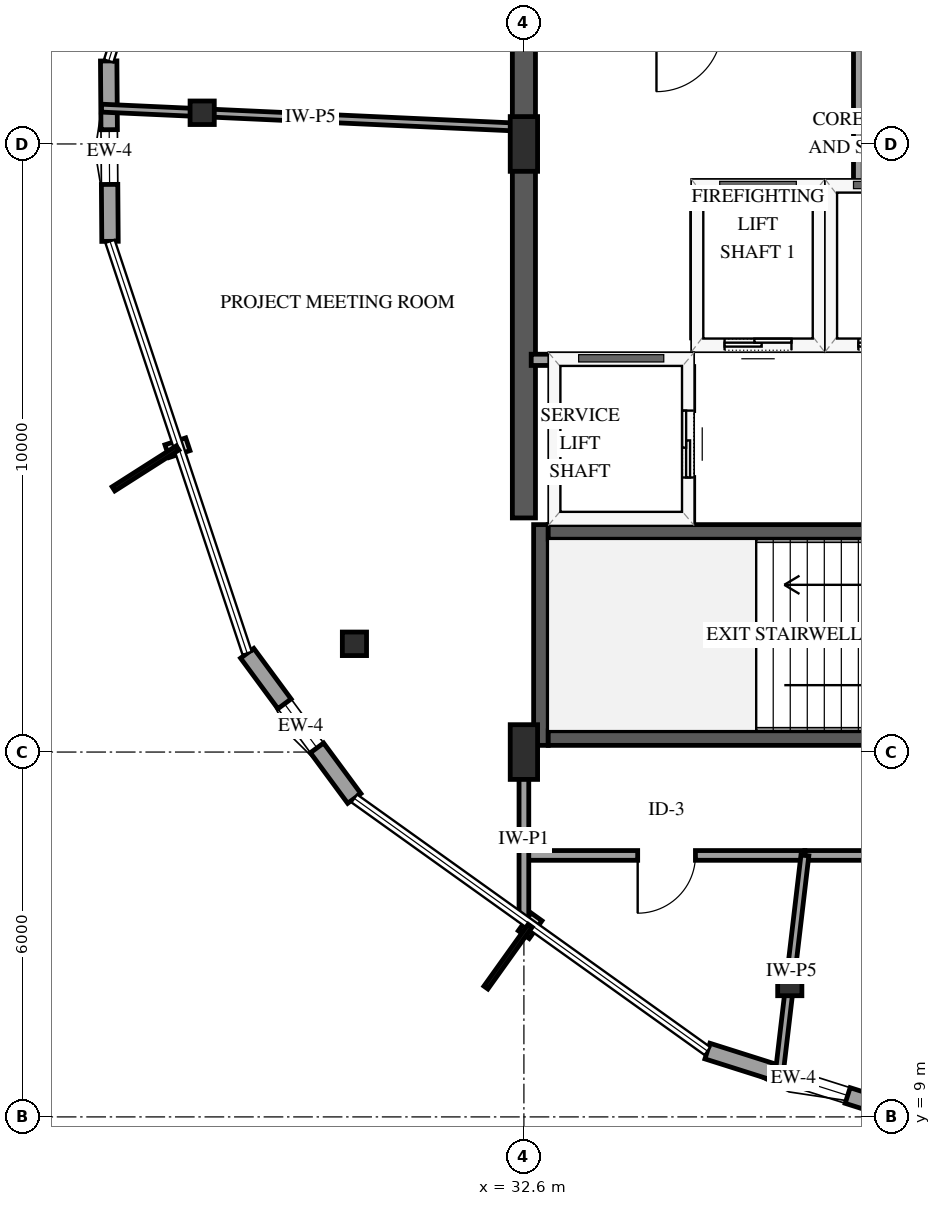
"""IFC4 building model, lengths in metres.
Left out: names, types, materials, properties, quantities, classifications, styles, units other than length and angle.
Written with IfcOpenShell. Run it as: python <this file> out.ifc"""

import sys

from ifc_helpers import new_model, si_unit, direction, frame, frame_2d, origin, origin_2d, place, context, subcontext, project, spatial, rectangle, i_section, extrude, element, fill, save


model = new_model("IFC4")
c1 = context("Model", 3, precision=1e-05, world=origin(), true_north=direction((0.0, 1.0)))
c2 = subcontext(c1, "Body", "Model", "MODEL_VIEW")
j1 = project(units=[si_unit("LENGTHUNIT", "METRE"), si_unit("PLANEANGLEUNIT", "RADIAN")], contexts=[c1])
p1 = place(None, origin())
s1 = spatial("IfcSite", under=j1, at=p1, CompositionType="ELEMENT")
p2 = place(p1, origin())
s2 = spatial("IfcBuilding", under=s1, at=p2, CompositionType="ELEMENT")
p3 = place(p2, frame((0.0, 0.0, 301.45)))
s3 = spatial("IfcBuildingStorey", under=s2, at=p3, CompositionType="ELEMENT", Elevation=301.45)
p4 = place(p3, frame((32.88, 15.11, 0.0), z_axis=(0.0, 0.0, 1.0), x_axis=(0.0, 1.0, 0.0)))
e1 = element("IfcWall", 1, at=p4, inside=s3, PredefinedType="SHEAR", context=c2, shape_type="SweptSolid", body=[
    extrude(rectangle(XDim=3.63, YDim=0.24, at=frame_2d((1.815, 0.0))), origin(), (0.0, 0.0, 1.0), 4.2),
])
for number, where, z_axis, x_axis in (
    (2, (33.0, 15.23, 0.0), (0.0, 0.0, 1.0), (1.0, 0.0, 0.0)),
    (3, (33.0, 18.62, 0.0), (0.0, 0.0, 1.0), (1.0, 0.0, 0.0)),
):
    element("IfcWall", number, at=place(p3, frame(where, z_axis=z_axis, x_axis=x_axis)), inside=s3, PredefinedType="SHEAR", context=c2, shape_type="SweptSolid", body=[
        extrude(rectangle(XDim=8.0, YDim=0.24, at=frame_2d((4.0, 0.0))), origin(), (0.0, 0.0, 1.0), 4.2),
    ])
p5 = place(p3, frame((32.6, 18.85, 0.0), z_axis=(0.0, 0.0, 1.0), x_axis=(0.0, 1.0, 0.0)))
e4 = element("IfcWall", 4, at=p5, inside=s3, PredefinedType="SHEAR", context=c2, shape_type="SweptSolid", body=[
    extrude(rectangle(XDim=12.3, YDim=0.38, at=frame_2d((6.15, 0.0))), origin(), (0.0, 0.0, 1.0), 4.2),
])
for number, where, z_axis, x_axis in (
    (5, (32.6, 15.0, 0.0), (0.0, 0.0, 1.0), (1.0, 0.0, 0.0)),
    (6, (32.6, 25.0, 0.0), (0.0, 0.0, 1.0), (1.0, 0.0, 0.0)),
):
    element("IfcColumn", number, at=place(p3, frame(where, z_axis=z_axis, x_axis=x_axis)), inside=s3, PredefinedType="PILASTER", context=c2, shape_type="SweptSolid", body=[
        extrude(rectangle(XDim=0.45, YDim=0.9, at=origin_2d()), origin(), (0.0, 0.0, 1.0), 4.2),
    ])
for number, where, z_axis, x_axis in (
    (7, (27.309, 25.513, 0.0), (0.0, 0.0, 1.0), (1.0, 0.0, 0.0)),
    (8, (29.813, 16.78, 0.0), (0.0, 0.0, 1.0), (1.0, 0.0, 0.0)),
    (9, (36.972, 11.187, 0.0), (0.0, 0.0, 1.0), (1.0, 0.0, 0.0)),
):
    element("IfcColumn", number, at=place(p3, frame(where, z_axis=z_axis, x_axis=x_axis)), inside=s3, PredefinedType="COLUMN", context=c2, shape_type="SweptSolid", body=[
        extrude(i_section(OverallWidth=0.398, OverallDepth=0.387, WebThickness=0.021, FlangeThickness=0.033, FilletRadius=0.038, at=origin_2d()), origin(), (0.0, 0.0, 1.0), 4.2),
    ])
p6 = place(p3, frame((25.771, 26.365, 0.0), z_axis=(0.0, 0.0, 1.0), x_axis=(0.007324906367, -0.999973172514, 0.0)))
e10 = element("IfcWall", 10, at=p6, inside=s3, PredefinedType="SOLIDWALL", context=c2, shape_type="SweptSolid", body=[
    extrude(rectangle(XDim=2.966, YDim=0.27, at=frame_2d((1.483, 0.0))), origin(), (0.0, 0.0, 1.0), 3.274),
])
p7 = place(p6, frame((1.131, 0.0, 0.75)))
e11 = element("IfcOpeningElement", 11, at=p7, cuts=e10, PredefinedType="OPENING", context=c2, shape_type="SweptSolid", body=[
    extrude(rectangle(XDim=0.9, YDim=1.5, at=frame_2d((0.45, 0.75))), frame((0.0, 0.145, 0.0), z_axis=(0.0, -1.0, 0.0), x_axis=(1.0, 0.0, 0.0)), (0.0, 0.0, 1.0), 0.29),
])
p8 = place(p3, frame((28.049, 16.624, 0.0), z_axis=(0.0, 0.0, 1.0), x_axis=(0.593687389238, -0.804695770997, 0.0)))
e12 = element("IfcWall", 12, at=p8, inside=s3, PredefinedType="SOLIDWALL", context=c2, shape_type="SweptSolid", body=[
    extrude(rectangle(XDim=2.967, YDim=0.27, at=frame_2d((1.483, 0.0))), origin(), (0.0, 0.0, 1.0), 3.274),
])
p9 = place(p8, frame((1.033, 0.0, 0.75)))
e13 = element("IfcOpeningElement", 13, at=p9, cuts=e12, PredefinedType="OPENING", context=c2, shape_type="SweptSolid", body=[
    extrude(rectangle(XDim=0.9, YDim=1.5, at=frame_2d((0.45, 0.75))), frame((0.0, 0.145, 0.0), z_axis=(0.0, -1.0, 0.0), x_axis=(1.0, 0.0, 0.0)), (0.0, 0.0, 1.0), 0.29),
])
p10 = place(p3, frame((35.618, 10.083, 0.0), z_axis=(0.0, 0.0, 1.0), x_axis=(0.953301162706, -0.302021345574, 0.0)))
e14 = element("IfcWall", 14, at=p10, inside=s3, PredefinedType="SOLIDWALL", context=c2, shape_type="SweptSolid", body=[
    extrude(rectangle(XDim=2.967, YDim=0.27, at=frame_2d((1.483, 0.0))), origin(), (0.0, 0.0, 1.0), 3.274),
])
p11 = place(p10, frame((1.519, 0.0, 0.75)))
e15 = element("IfcOpeningElement", 15, at=p11, cuts=e14, PredefinedType="OPENING", context=c2, shape_type="SweptSolid", body=[
    extrude(rectangle(XDim=0.9, YDim=1.5, at=frame_2d((0.45, 0.75))), frame((0.0, 0.145, 0.0), z_axis=(0.0, -1.0, 0.0), x_axis=(1.0, 0.0, 0.0)), (0.0, 0.0, 1.0), 0.29),
])
p12 = place(p3, frame((35.45, 21.7, 0.0), z_axis=(0.0, 0.0, 1.0), x_axis=(1.0, 0.0, 0.0)))
e16 = element("IfcWall", 16, at=p12, inside=s3, PredefinedType="SOLIDWALL", context=c2, shape_type="SweptSolid", body=[
    extrude(rectangle(XDim=2.0, YDim=0.185, at=frame_2d((1.0, 0.0))), origin(), (0.0, 0.0, 1.0), 3.895),
])
p13 = place(p12, frame((0.45, 0.0, 0.0)))
e17 = element("IfcOpeningElement", 17, at=p13, cuts=e16, PredefinedType="OPENING", context=c2, shape_type="SweptSolid", body=[
    extrude(rectangle(XDim=1.1, YDim=2.15, at=frame_2d((0.55, 1.075))), frame((0.0, 0.103, 0.0), z_axis=(0.0, -1.0, 0.0), x_axis=(1.0, 0.0, 0.0)), (0.0, 0.0, 1.0), 0.205),
])
p14 = place(p3, frame((35.45, 24.3, 0.0), z_axis=(0.0, 0.0, 1.0), x_axis=(1.0, 0.0, 0.0)))
e18 = element("IfcWall", 18, at=p14, inside=s3, PredefinedType="SOLIDWALL", context=c2, shape_type="SweptSolid", body=[
    extrude(rectangle(XDim=2.0, YDim=0.185, at=frame_2d((1.0, 0.0))), origin(), (0.0, 0.0, 1.0), 3.895),
])
for number, where, z_axis, x_axis in (
    (19, (35.45, 21.81, 0.0), (0.0, 0.0, 1.0), (0.0, 1.0, 0.0)),
    (20, (37.45, 21.81, 0.0), (0.0, 0.0, 1.0), (0.0, 1.0, 0.0)),
):
    element("IfcWall", number, at=place(p3, frame(where, z_axis=z_axis, x_axis=x_axis)), inside=s3, PredefinedType="SOLIDWALL", context=c2, shape_type="SweptSolid", body=[
        extrude(rectangle(XDim=2.38, YDim=0.185, at=frame_2d((1.19, 0.0))), origin(), (0.0, 0.0, 1.0), 3.895),
    ])
p15 = place(p3, frame((37.65, 21.7, 0.0), z_axis=(0.0, 0.0, 1.0), x_axis=(1.0, 0.0, 0.0)))
e21 = element("IfcWall", 21, at=p15, inside=s3, PredefinedType="SOLIDWALL", context=c2, shape_type="SweptSolid", body=[
    extrude(rectangle(XDim=2.0, YDim=0.185, at=frame_2d((1.0, 0.0))), origin(), (0.0, 0.0, 1.0), 3.895),
])
p16 = place(p15, frame((0.45, 0.0, 0.0)))
e22 = element("IfcOpeningElement", 22, at=p16, cuts=e21, PredefinedType="OPENING", context=c2, shape_type="SweptSolid", body=[
    extrude(rectangle(XDim=1.1, YDim=2.15, at=frame_2d((0.55, 1.075))), frame((0.0, 0.103, 0.0), z_axis=(0.0, -1.0, 0.0), x_axis=(1.0, 0.0, 0.0)), (0.0, 0.0, 1.0), 0.205),
])
p17 = place(p3, frame((37.65, 24.3, 0.0), z_axis=(0.0, 0.0, 1.0), x_axis=(1.0, 0.0, 0.0)))
e23 = element("IfcWall", 23, at=p17, inside=s3, PredefinedType="SOLIDWALL", context=c2, shape_type="SweptSolid", body=[
    extrude(rectangle(XDim=2.0, YDim=0.185, at=frame_2d((1.0, 0.0))), origin(), (0.0, 0.0, 1.0), 3.895),
])
p18 = place(p3, frame((32.72, 21.45, 0.0), z_axis=(0.0, 0.0, 1.0), x_axis=(1.0, 0.0, 0.0)))
e24 = element("IfcWall", 24, at=p18, inside=s3, PredefinedType="SOLIDWALL", context=c2, shape_type="SweptSolid", body=[
    extrude(rectangle(XDim=2.58, YDim=0.185, at=frame_2d((1.29, 0.0))), origin(), (0.0, 0.0, 1.0), 3.895),
])
p19 = place(p3, frame((35.3, 18.79, 0.0), z_axis=(0.0, 0.0, 1.0), x_axis=(0.0, 1.0, 0.0)))
e25 = element("IfcWall", 25, at=p19, inside=s3, PredefinedType="SOLIDWALL", context=c2, shape_type="SweptSolid", body=[
    extrude(rectangle(XDim=2.55, YDim=0.185, at=frame_2d((1.275, 0.0))), origin(), (0.0, 0.0, 1.0), 3.895),
])
p20 = place(p19, frame((0.725, 0.0, 0.0)))
e26 = element("IfcOpeningElement", 26, at=p20, cuts=e25, PredefinedType="OPENING", context=c2, shape_type="SweptSolid", body=[
    extrude(rectangle(XDim=1.1, YDim=2.15, at=frame_2d((0.55, 1.075))), frame((0.0, 0.103, 0.0), z_axis=(0.0, -1.0, 0.0), x_axis=(1.0, 0.0, 0.0)), (0.0, 0.0, 1.0), 0.205),
])
p21 = place(p3, frame((46.18, 13.3, 0.0), z_axis=(0.0, 0.0, 1.0), x_axis=(-1.0, 0.0, 0.0)))
e27 = element("IfcWall", 27, at=p21, inside=s3, PredefinedType="PARTITIONING", context=c2, shape_type="SweptSolid", body=[
    extrude(rectangle(XDim=8.959, YDim=0.16, at=frame_2d((4.479, 0.0))), origin(), (0.0, 0.0, 1.0), 3.895),
])
p22 = place(p21, frame((4.005, 0.0, 0.0)))
e28 = element("IfcOpeningElement", 28, at=p22, cuts=e27, PredefinedType="OPENING", context=c2, shape_type="SweptSolid", body=[
    extrude(rectangle(XDim=0.95, YDim=2.15, at=frame_2d((0.475, 1.075))), frame((0.0, 0.09, 0.0), z_axis=(0.0, -1.0, 0.0), x_axis=(1.0, 0.0, 0.0)), (0.0, 0.0, 1.0), 0.18),
])
p23 = place(p3, frame((32.527, 25.276, 0.0), z_axis=(0.0, 0.0, 1.0), x_axis=(-0.99896311896, 0.045526771868, 0.0)))
e29 = element("IfcWall", 29, at=p23, inside=s3, PredefinedType="PARTITIONING", context=c2, shape_type="SweptSolid", body=[
    extrude(rectangle(XDim=6.88, YDim=0.13, at=frame_2d((3.44, 0.0))), origin(), (0.0, 0.0, 1.0), 3.19),
])
p24 = place(p3, frame((37.221, 13.3, 0.0), z_axis=(0.0, 0.0, 1.0), x_axis=(-1.0, 0.0, 0.0)))
e30 = element("IfcWall", 30, at=p24, inside=s3, PredefinedType="PARTITIONING", context=c2, shape_type="SweptSolid", body=[
    extrude(rectangle(XDim=4.551, YDim=0.16, at=frame_2d((2.275, 0.0))), origin(), (0.0, 0.0, 1.0), 3.895),
])
p25 = place(p24, frame((1.8, 0.0, 0.0)))
e31 = element("IfcOpeningElement", 31, at=p25, cuts=e30, PredefinedType="OPENING", context=c2, shape_type="SweptSolid", body=[
    extrude(rectangle(XDim=0.95, YDim=2.15, at=frame_2d((0.475, 1.075))), frame((0.0, 0.09, 0.0), z_axis=(0.0, -1.0, 0.0), x_axis=(1.0, 0.0, 0.0)), (0.0, 0.0, 1.0), 0.18),
])
p26 = place(p3, frame((37.221, 13.3, 0.0), z_axis=(0.0, 0.0, 1.0), x_axis=(-0.116948716677, -0.993137955003, 0.0)))
e32 = element("IfcWall", 32, at=p26, inside=s3, PredefinedType="PARTITIONING", context=c2, shape_type="SweptSolid", body=[
    extrude(rectangle(XDim=3.822, YDim=0.13, at=frame_2d((1.911, 0.0))), origin(), (0.0, 0.0, 1.0), 3.895),
])
p27 = place(p3, frame((32.6, 12.242, 0.0), z_axis=(0.0, 0.0, 1.0), x_axis=(0.0, 1.0, 0.0)))
e33 = element("IfcWall", 33, at=p27, inside=s3, PredefinedType="PARTITIONING", context=c2, shape_type="SweptSolid", body=[
    extrude(rectangle(XDim=2.638, YDim=0.16, at=frame_2d((1.319, 0.0))), origin(), (0.0, 0.0, 1.0), 3.895),
])
p28 = place(p3, frame((38.1, 26.88, 0.0), z_axis=(0.0, 0.0, 1.0), x_axis=(0.0, -1.0, 0.0)))
e34 = element("IfcWall", 34, at=p28, inside=s3, PredefinedType="PARTITIONING", context=c2, shape_type="SweptSolid", body=[
    extrude(rectangle(XDim=2.58, YDim=0.16, at=frame_2d((1.29, 0.0))), origin(), (0.0, 0.0, 1.0), 3.895),
])
p29 = place(p7, origin())
e35 = element("IfcWindow", 35, at=p29, inside=s3, PartitioningType="SINGLE_PANEL", PredefinedType="WINDOW", context=c2, shape_type="SweptSolid", body=[
    extrude(rectangle(XDim=0.9, YDim=1.5, at=frame_2d((0.45, 0.75))), frame((0.0, 0.03, 0.0), z_axis=(0.0, -1.0, 0.0), x_axis=(1.0, 0.0, 0.0)), (0.0, 0.0, 1.0), 0.06),
])
fill(e11, e35)
p30 = place(p9, origin())
e36 = element("IfcWindow", 36, at=p30, inside=s3, PartitioningType="SINGLE_PANEL", PredefinedType="WINDOW", context=c2, shape_type="SweptSolid", body=[
    extrude(rectangle(XDim=0.9, YDim=1.5, at=frame_2d((0.45, 0.75))), frame((0.0, 0.03, 0.0), z_axis=(0.0, -1.0, 0.0), x_axis=(1.0, 0.0, 0.0)), (0.0, 0.0, 1.0), 0.06),
])
fill(e13, e36)
p31 = place(p11, origin())
e37 = element("IfcWindow", 37, at=p31, inside=s3, PartitioningType="SINGLE_PANEL", PredefinedType="WINDOW", context=c2, shape_type="SweptSolid", body=[
    extrude(rectangle(XDim=0.9, YDim=1.5, at=frame_2d((0.45, 0.75))), frame((0.0, 0.03, 0.0), z_axis=(0.0, -1.0, 0.0), x_axis=(1.0, 0.0, 0.0)), (0.0, 0.0, 1.0), 0.06),
])
fill(e15, e37)
p32 = place(p13, origin())
e38 = element("IfcDoor", 38, at=p32, inside=s3, OperationType="SLIDING_TO_LEFT", PredefinedType="DOOR", context=c2, shape_type="SweptSolid", body=[
    extrude(rectangle(XDim=1.1, YDim=2.15, at=frame_2d((0.55, 1.075))), frame((0.0, 0.025, 0.0), z_axis=(0.0, -1.0, 0.0), x_axis=(1.0, 0.0, 0.0)), (0.0, 0.0, 1.0), 0.05),
])
fill(e17, e38)
p33 = place(p16, origin())
e39 = element("IfcDoor", 39, at=p33, inside=s3, OperationType="SLIDING_TO_LEFT", PredefinedType="DOOR", context=c2, shape_type="SweptSolid", body=[
    extrude(rectangle(XDim=1.1, YDim=2.15, at=frame_2d((0.55, 1.075))), frame((0.0, 0.025, 0.0), z_axis=(0.0, -1.0, 0.0), x_axis=(1.0, 0.0, 0.0)), (0.0, 0.0, 1.0), 0.05),
])
fill(e22, e39)
p34 = place(p20, origin())
e40 = element("IfcDoor", 40, at=p34, inside=s3, OperationType="SLIDING_TO_LEFT", PredefinedType="DOOR", context=c2, shape_type="SweptSolid", body=[
    extrude(rectangle(XDim=1.1, YDim=2.15, at=frame_2d((0.55, 1.075))), frame((0.0, 0.025, 0.0), z_axis=(0.0, -1.0, 0.0), x_axis=(1.0, 0.0, 0.0)), (0.0, 0.0, 1.0), 0.05),
])
fill(e26, e40)
p35 = place(p25, origin())
e41 = element("IfcDoor", 41, at=p35, inside=s3, OperationType="SINGLE_SWING_RIGHT", PredefinedType="DOOR", context=c2, shape_type="SweptSolid", body=[
    extrude(rectangle(XDim=0.95, YDim=2.15, at=frame_2d((0.475, 1.075))), frame((0.0, 0.025, 0.0), z_axis=(0.0, -1.0, 0.0), x_axis=(1.0, 0.0, 0.0)), (0.0, 0.0, 1.0), 0.05),
])
fill(e31, e41)
save(model, sys.argv[1])
